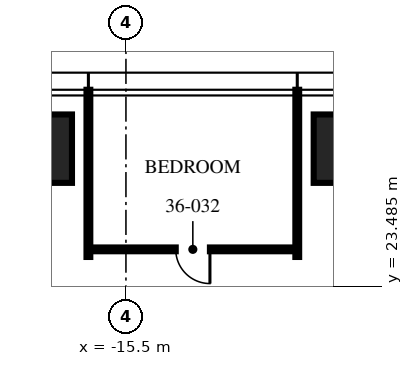
"""IFC4 building model, lengths in metres.
Left out: names, types, materials, properties, quantities, classifications, styles, units other than length and angle.
Written with IfcOpenShell. Run it as: python <this file> out.ifc"""

import sys

from ifc_helpers import new_model, si_unit, direction, frame, frame_2d, origin, origin_2d, place, context, subcontext, project, spatial, rectangle, extrude, element, fill, save


model = new_model("IFC4")
c1 = context("Model", 3, precision=1e-05, world=origin(), true_north=direction((0.0, 1.0)))
c2 = subcontext(c1, "Body", "Model", "MODEL_VIEW")
j1 = project(units=[si_unit("LENGTHUNIT", "METRE"), si_unit("PLANEANGLEUNIT", "RADIAN")], contexts=[c1])
p1 = place(None, origin())
s1 = spatial("IfcSite", under=j1, at=p1, CompositionType="ELEMENT")
p2 = place(p1, origin())
s2 = spatial("IfcBuilding", under=s1, at=p2, CompositionType="ELEMENT")
p3 = place(p2, frame((0.0, 0.0, 144.75)))
s3 = spatial("IfcBuildingStorey", under=s2, at=p3, CompositionType="ELEMENT", Elevation=144.75)
for number, where, z_axis, x_axis in (
    (1, (-18.32, 27.1, 0.0), (0.0, 0.0, 1.0), (1.0, 0.0, 0.0)),
    (2, (-9.16, 27.1, 0.0), (0.0, 0.0, 1.0), (1.0, 0.0, 0.0)),
):
    element("IfcColumn", number, at=place(p3, frame(where, z_axis=z_axis, x_axis=x_axis)), inside=s3, PredefinedType="COLUMN", context=c2, shape_type="SweptSolid", body=[
        extrude(rectangle(XDim=2.8, YDim=1.8, at=origin_2d()), origin(), (0.0, 0.0, 1.0), 3.75),
    ])
for number, where, z_axis, x_axis in (
    (3, (-10.992, 24.25, 0.0), (0.0, 0.0, 1.0), (0.0, 1.0, 0.0)),
    (4, (-16.488, 24.25, 0.0), (0.0, 0.0, 1.0), (0.0, 1.0, 0.0)),
):
    element("IfcWall", number, at=place(p3, frame(where, z_axis=z_axis, x_axis=x_axis)), inside=s3, PredefinedType="PARTITIONING", context=c2, shape_type="SweptSolid", body=[
        extrude(rectangle(XDim=4.4, YDim=0.1, at=frame_2d((2.2, 0.0))), origin(), (0.0, 0.0, 1.0), 2.81),
    ])
p4 = place(p3, frame((-10.992, 24.45, 0.0), z_axis=(0.0, 0.0, 1.0), x_axis=(-1.0, 0.0, 0.0)))
e5 = element("IfcWall", 5, at=p4, inside=s3, PredefinedType="PARTITIONING", context=c2, shape_type="SweptSolid", body=[
    extrude(rectangle(XDim=5.496, YDim=0.1, at=frame_2d((2.748, 0.0))), origin(), (0.0, 0.0, 1.0), 2.81),
])
p5 = place(p4, frame((2.298, 0.0, 0.0)))
e6 = element("IfcOpeningElement", 6, at=p5, cuts=e5, PredefinedType="OPENING", context=c2, shape_type="SweptSolid", body=[
    extrude(rectangle(XDim=0.9, YDim=2.1, at=frame_2d((0.45, 1.05))), frame((0.0, 0.06, 0.0), z_axis=(0.0, -1.0, 0.0), x_axis=(1.0, 0.0, 0.0)), (0.0, 0.0, 1.0), 0.12),
])
p6 = place(p5, origin())
e7 = element("IfcDoor", 7, at=p6, inside=s3, OperationType="SINGLE_SWING_LEFT", PredefinedType="DOOR", context=c2, shape_type="SweptSolid", body=[
    extrude(rectangle(XDim=0.9, YDim=2.1, at=frame_2d((0.45, 1.05))), frame((0.0, 0.025, 0.0), z_axis=(0.0, -1.0, 0.0), x_axis=(1.0, 0.0, 0.0)), (0.0, 0.0, 1.0), 0.05),
])
fill(e6, e7)
save(model, sys.argv[1])
